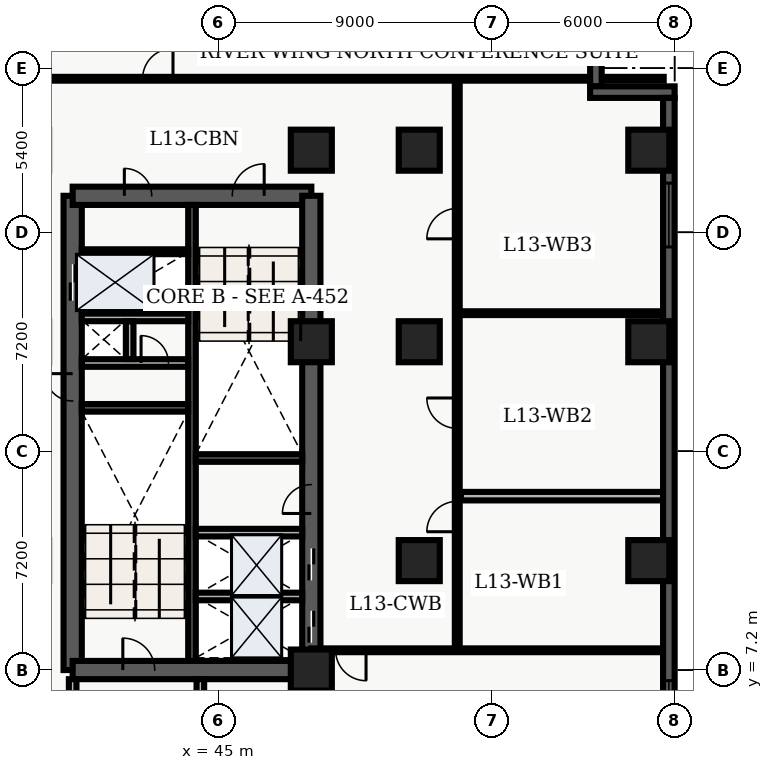
"""IFC4 building model, lengths in metres.
Left out: names, types, materials, properties, quantities, classifications, styles, units other than length and angle.
Written with IfcOpenShell. Run it as: python <this file> out.ifc"""

import sys

from ifc_helpers import new_model, entity, si_unit, converted_unit, direction, frame, origin_with_axes, origin_2d_with_axis, place, context, subcontext, project, spatial, polyline, rectangle, outline, extrude, element, fill, save


model = new_model("IFC4")
c1 = context("Model", 3, precision=1e-05, world=origin_with_axes(), true_north=direction((0.0, 1.0)))
c2 = subcontext(c1, "Body", "Model", "MODEL_VIEW")
j1 = project(units=[si_unit("LENGTHUNIT", "METRE"), converted_unit("PLANEANGLEUNIT", "DEGREE", entity("IfcPlaneAngleMeasure", 0.017), si_unit("PLANEANGLEUNIT", "RADIAN"), dimensions=[0, 0, 0, 0, 0, 0, 0])], contexts=[c1])
p1 = place(None, origin_with_axes())
s1 = spatial("IfcSite", under=j1, at=p1, CompositionType="ELEMENT")
p2 = place(p1, origin_with_axes())
s2 = spatial("IfcBuilding", under=s1, at=p2, CompositionType="ELEMENT")
p3 = place(p2, frame((0.0, 0.0, 56.1), z_axis=(0.0, 0.0, 1.0), x_axis=(1.0, 0.0, 0.0)))
s3 = spatial("IfcBuildingStorey", under=s2, at=p3, CompositionType="ELEMENT", Elevation=56.1)
p4 = place(p3, frame((40.2, 7.2, 0.0), z_axis=(0.0, 0.0, 1.0), x_axis=(0.0, 1.0, 0.0)))
e1 = element("IfcWall", 1, at=p4, inside=s3, PredefinedType="SHEAR", context=c2, shape_type="SweptSolid", body=[
    extrude(outline(polyline([(0.0, -0.3), (15.6, -0.3), (15.6, 0.3), (0.0, 0.3), (0.0, -0.3)])), origin_with_axes(), (0.0, 0.0, 1.0), 3.66),
])
p5 = place(p4, frame((12.75, 0.0, 0.0), z_axis=(0.0, 0.0, 1.0), x_axis=(1.0, 0.0, 0.0)))
e2 = element("IfcOpeningElement", 2, at=p5, cuts=e1, PredefinedType="OPENING", context=c2, shape_type="SweptSolid", body=[
    extrude(rectangle(XDim=1.2, YDim=0.62, at=origin_2d_with_axis()), origin_with_axes(), (0.0, 0.0, 1.0), 2.15),
])
p6 = place(p4, frame((9.3, 0.0, 0.0), z_axis=(0.0, 0.0, 1.0), x_axis=(1.0, 0.0, 0.0)))
e3 = element("IfcOpeningElement", 3, at=p6, cuts=e1, PredefinedType="OPENING", context=c2, shape_type="SweptSolid", body=[
    extrude(rectangle(XDim=0.9, YDim=0.62, at=origin_2d_with_axis()), origin_with_axes(), (0.0, 0.0, 1.0), 2.15),
])
p7 = place(p3, frame((40.2, 7.2, 0.0), z_axis=(0.0, 0.0, 1.0), x_axis=(1.0, 0.0, 0.0)))
e4 = element("IfcWall", 4, at=p7, inside=s3, PredefinedType="SHEAR", context=c2, shape_type="SweptSolid", body=[
    extrude(outline(polyline([(0.0, -0.3), (7.85, -0.3), (7.85, 0.3), (0.0, 0.3), (0.0, -0.3)])), origin_with_axes(), (0.0, 0.0, 1.0), 3.66),
])
p8 = place(p7, frame((2.175, 0.0, 0.0), z_axis=(0.0, 0.0, 1.0), x_axis=(1.0, 0.0, 0.0)))
e5 = element("IfcOpeningElement", 5, at=p8, cuts=e4, PredefinedType="OPENING", context=c2, shape_type="SweptSolid", body=[
    extrude(rectangle(XDim=1.05, YDim=0.62, at=origin_2d_with_axis()), origin_with_axes(), (0.0, 0.0, 1.0), 2.15),
])
p9 = place(p3, frame((40.2, 22.8, 0.0), z_axis=(0.0, 0.0, 1.0), x_axis=(1.0, 0.0, 0.0)))
e6 = element("IfcWall", 6, at=p9, inside=s3, PredefinedType="SHEAR", context=c2, shape_type="SweptSolid", body=[
    extrude(outline(polyline([(0.0, -0.3), (7.85, -0.3), (7.85, 0.3), (0.0, 0.3), (0.0, -0.3)])), origin_with_axes(), (0.0, 0.0, 1.0), 3.66),
])
p10 = place(p9, frame((5.775, 0.0, 0.0), z_axis=(0.0, 0.0, 1.0), x_axis=(1.0, 0.0, 0.0)))
e7 = element("IfcOpeningElement", 7, at=p10, cuts=e6, PredefinedType="OPENING", context=c2, shape_type="SweptSolid", body=[
    extrude(rectangle(XDim=1.05, YDim=0.62, at=origin_2d_with_axis()), origin_with_axes(), (0.0, 0.0, 1.0), 2.15),
])
p11 = place(p9, frame((2.15, 0.0, 0.0), z_axis=(0.0, 0.0, 1.0), x_axis=(1.0, 0.0, 0.0)))
e8 = element("IfcOpeningElement", 8, at=p11, cuts=e6, PredefinedType="OPENING", context=c2, shape_type="SweptSolid", body=[
    extrude(rectangle(XDim=0.9, YDim=0.62, at=origin_2d_with_axis()), origin_with_axes(), (0.0, 0.0, 1.0), 2.15),
])
p12 = place(p3, frame((48.05, 7.2, 0.0), z_axis=(0.0, 0.0, 1.0), x_axis=(0.0, 1.0, 0.0)))
e9 = element("IfcWall", 9, at=p12, inside=s3, PredefinedType="SHEAR", context=c2, shape_type="SweptSolid", body=[
    extrude(outline(polyline([(0.0, -0.3), (15.6, -0.3), (15.6, 0.3), (0.0, 0.3), (0.0, -0.3)])), origin_with_axes(), (0.0, 0.0, 1.0), 3.66),
])
p13 = place(p12, frame((1.425, 0.0, 0.0), z_axis=(0.0, 0.0, 1.0), x_axis=(1.0, 0.0, 0.0)))
e10 = element("IfcOpeningElement", 10, at=p13, cuts=e9, PredefinedType="OPENING", context=c2, shape_type="SweptSolid", body=[
    extrude(rectangle(XDim=1.05, YDim=0.62, at=origin_2d_with_axis()), origin_with_axes(), (0.0, 0.0, 1.0), 2.15),
])
p14 = place(p12, frame((3.475, 0.0, 0.0), z_axis=(0.0, 0.0, 1.0), x_axis=(1.0, 0.0, 0.0)))
e11 = element("IfcOpeningElement", 11, at=p14, cuts=e9, PredefinedType="OPENING", context=c2, shape_type="SweptSolid", body=[
    extrude(rectangle(XDim=1.05, YDim=0.62, at=origin_2d_with_axis()), origin_with_axes(), (0.0, 0.0, 1.0), 2.15),
])
p15 = place(p12, frame((5.625, 0.0, 0.0), z_axis=(0.0, 0.0, 1.0), x_axis=(1.0, 0.0, 0.0)))
e12 = element("IfcOpeningElement", 12, at=p15, cuts=e9, PredefinedType="OPENING", context=c2, shape_type="SweptSolid", body=[
    extrude(rectangle(XDim=0.95, YDim=0.62, at=origin_2d_with_axis()), origin_with_axes(), (0.0, 0.0, 1.0), 2.15),
])
p16 = place(p3, frame((44.125, 7.5, 0.0), z_axis=(0.0, 0.0, 1.0), x_axis=(0.0, 1.0, 0.0)))
e13 = element("IfcWall", 13, at=p16, inside=s3, PredefinedType="SHEAR", context=c2, shape_type="SweptSolid", body=[
    extrude(outline(polyline([(0.0, -0.125), (15.0, -0.125), (15.0, 0.125), (0.0, 0.125), (0.0, -0.125)])), origin_with_axes(), (0.0, 0.0, 1.0), 3.66),
])
for number, where, z_axis, x_axis in (
    (14, (40.5, 15.825, 0.0), (0.0, 0.0, 1.0), (1.0, 0.0, 0.0)),
    (15, (44.25, 14.175, 0.0), (0.0, 0.0, 1.0), (1.0, 0.0, 0.0)),
):
    element("IfcWall", number, at=place(p3, frame(where, z_axis=z_axis, x_axis=x_axis)), inside=s3, PredefinedType="SHEAR", context=c2, shape_type="SweptSolid", body=[
        extrude(outline(polyline([(0.0, -0.125), (3.5, -0.125), (3.5, 0.125), (0.0, 0.125), (0.0, -0.125)])), origin_with_axes(), (0.0, 0.0, 1.0), 3.66),
    ])
p17 = place(p3, frame((40.5, 17.3, 0.0), z_axis=(0.0, 0.0, 1.0), x_axis=(1.0, 0.0, 0.0)))
e16 = element("IfcWall", 16, at=p17, inside=s3, PredefinedType="SOLIDWALL", context=c2, shape_type="SweptSolid", body=[
    extrude(outline(polyline([(0.0, -0.125), (3.5, -0.125), (3.5, 0.125), (0.0, 0.125), (0.0, -0.125)])), origin_with_axes(), (0.0, 0.0, 1.0), 2.7),
])
p18 = place(p17, frame((2.4, 0.0, 0.0), z_axis=(0.0, 0.0, 1.0), x_axis=(1.0, 0.0, 0.0)))
e17 = element("IfcOpeningElement", 17, at=p18, cuts=e16, PredefinedType="OPENING", context=c2, shape_type="SweptSolid", body=[
    extrude(rectangle(XDim=0.9, YDim=0.27, at=origin_2d_with_axis()), origin_with_axes(), (0.0, 0.0, 1.0), 2.15),
])
p19 = place(p3, frame((40.5, 18.8, 0.0), z_axis=(0.0, 0.0, 1.0), x_axis=(1.0, 0.0, 0.0)))
e18 = element("IfcWall", 18, at=p19, inside=s3, PredefinedType="SOLIDWALL", context=c2, shape_type="SweptSolid", body=[
    extrude(outline(polyline([(0.0, -0.125), (3.5, -0.125), (3.5, 0.125), (0.0, 0.125), (0.0, -0.125)])), origin_with_axes(), (0.0, 0.0, 1.0), 2.7),
])
p20 = place(p3, frame((42.075, 17.43, 0.0), z_axis=(0.0, 0.0, 1.0), x_axis=(0.0, 1.0, 0.0)))
e19 = element("IfcWall", 19, at=p20, inside=s3, PredefinedType="SOLIDWALL", context=c2, shape_type="SweptSolid", body=[
    extrude(outline(polyline([(0.0, -0.125), (1.24, -0.125), (1.24, 0.125), (0.0, 0.125), (0.0, -0.125)])), origin_with_axes(), (0.0, 0.0, 1.0), 2.7),
])
p21 = place(p3, frame((40.2, 3.1, 0.0), z_axis=(0.0, 0.0, 1.0), x_axis=(0.0, 1.0, 0.0)))
e20 = element("IfcWall", 20, at=p21, inside=s3, PredefinedType="SOLIDWALL", context=c2, shape_type="SweptSolid", body=[
    extrude(outline(polyline([(0.0, -0.125), (3.8, -0.125), (3.8, 0.125), (0.0, 0.125), (0.0, -0.125)])), origin_with_axes(), (0.0, 0.0, 1.0), 2.7),
])
p22 = place(p21, frame((2.075, 0.0, 0.0), z_axis=(0.0, 0.0, 1.0), x_axis=(1.0, 0.0, 0.0)))
e21 = element("IfcOpeningElement", 21, at=p22, cuts=e20, PredefinedType="OPENING", context=c2, shape_type="SweptSolid", body=[
    extrude(rectangle(XDim=1.05, YDim=0.27, at=origin_2d_with_axis()), origin_with_axes(), (0.0, 0.0, 1.0), 2.15),
])
p23 = place(p3, frame((44.4, 3.1, 0.0), z_axis=(0.0, 0.0, 1.0), x_axis=(0.0, 1.0, 0.0)))
e22 = element("IfcWall", 22, at=p23, inside=s3, PredefinedType="SOLIDWALL", context=c2, shape_type="SweptSolid", body=[
    extrude(outline(polyline([(0.0, -0.125), (3.8, -0.125), (3.8, 0.125), (0.0, 0.125), (0.0, -0.125)])), origin_with_axes(), (0.0, 0.0, 1.0), 2.7),
])
for number, where, z_axis, x_axis in (
    (23, (48.05, 7.2, 0.0), (0.0, 0.0, 1.0), (1.0, 0.0, 0.0)),
    (24, (48.05, 18.0, 0.0), (0.0, 0.0, 1.0), (1.0, 0.0, 0.0)),
    (25, (48.05, 24.3, 0.0), (0.0, 0.0, 1.0), (1.0, 0.0, 0.0)),
    (26, (51.6, 10.8, 0.0), (0.0, 0.0, 1.0), (1.0, 0.0, 0.0)),
    (27, (51.6, 18.0, 0.0), (0.0, 0.0, 1.0), (1.0, 0.0, 0.0)),
    (28, (51.6, 24.3, 0.0), (0.0, 0.0, 1.0), (1.0, 0.0, 0.0)),
    (29, (59.15, 10.8, 0.0), (0.0, 0.0, 1.0), (1.0, 0.0, 0.0)),
    (30, (59.15, 18.0, 0.0), (0.0, 0.0, 1.0), (1.0, 0.0, 0.0)),
    (31, (59.15, 24.3, 0.0), (0.0, 0.0, 1.0), (1.0, 0.0, 0.0)),
):
    element("IfcColumn", number, at=place(p3, frame(where, z_axis=z_axis, x_axis=x_axis)), inside=s3, PredefinedType="COLUMN", context=c2, shape_type="SweptSolid", body=[
        extrude(rectangle(XDim=1.35, YDim=1.35, at=origin_2d_with_axis()), origin_with_axes(), (0.0, 0.0, 1.0), 3.9),
    ])
p24 = place(p3, frame((40.5, 20.96, 0.0), z_axis=(0.0, 0.0, 1.0), x_axis=(1.0, 0.0, 0.0)))
e32 = element("IfcWall", 32, at=p24, inside=s3, PredefinedType="PARTITIONING", context=c2, shape_type="SweptSolid", body=[
    extrude(outline(polyline([(0.0, -0.08), (3.5, -0.08), (3.5, 0.08), (0.0, 0.08), (0.0, -0.08)])), origin_with_axes(), (0.0, 0.0, 1.0), 2.7),
])
for number, where, z_axis, x_axis in (
    (33, (44.25, 9.62, 0.0), (0.0, 0.0, 1.0), (1.0, 0.0, 0.0)),
    (34, (44.25, 11.72, 0.0), (0.0, 0.0, 1.0), (1.0, 0.0, 0.0)),
):
    element("IfcWall", number, at=place(p3, frame(where, z_axis=z_axis, x_axis=x_axis)), inside=s3, PredefinedType="SOLIDWALL", context=c2, shape_type="SweptSolid", body=[
        extrude(outline(polyline([(0.0, -0.125), (3.5, -0.125), (3.5, 0.125), (0.0, 0.125), (0.0, -0.125)])), origin_with_axes(), (0.0, 0.0, 1.0), 2.7),
    ])
p25 = place(p3, frame((52.85, 7.85, 0.0), z_axis=(0.0, 0.0, 1.0), x_axis=(0.0, 1.0, 0.0)))
e35 = element("IfcWall", 35, at=p25, inside=s3, PredefinedType="PARTITIONING", context=c2, shape_type="SweptSolid", body=[
    extrude(outline(polyline([(0.0, -0.08), (18.8, -0.08), (18.8, 0.08), (0.0, 0.08), (0.0, -0.08)])), origin_with_axes(), (0.0, 0.0, 1.0), 2.7),
])
p26 = place(p25, frame((4.4, 0.0, 0.0), z_axis=(0.0, 0.0, 1.0), x_axis=(1.0, 0.0, 0.0)))
e36 = element("IfcOpeningElement", 36, at=p26, cuts=e35, PredefinedType="OPENING", context=c2, shape_type="SweptSolid", body=[
    extrude(rectangle(XDim=1.0, YDim=0.18, at=origin_2d_with_axis()), origin_with_axes(), (0.0, 0.0, 1.0), 2.15),
])
p27 = place(p25, frame((7.799, 0.0, 0.0), z_axis=(0.0, 0.0, 1.0), x_axis=(1.0, 0.0, 0.0)))
e37 = element("IfcOpeningElement", 37, at=p27, cuts=e35, PredefinedType="OPENING", context=c2, shape_type="SweptSolid", body=[
    extrude(rectangle(XDim=1.0, YDim=0.18, at=origin_2d_with_axis()), origin_with_axes(), (0.0, 0.0, 1.0), 2.15),
])
p28 = place(p25, frame((14.034, 0.0, 0.0), z_axis=(0.0, 0.0, 1.0), x_axis=(1.0, 0.0, 0.0)))
e38 = element("IfcOpeningElement", 38, at=p28, cuts=e35, PredefinedType="OPENING", context=c2, shape_type="SweptSolid", body=[
    extrude(rectangle(XDim=1.0, YDim=0.18, at=origin_2d_with_axis()), origin_with_axes(), (0.0, 0.0, 1.0), 2.15),
])
p29 = place(p3, frame((59.64, 7.85, 0.0), z_axis=(0.0, 0.0, 1.0), x_axis=(-1.0, 0.0, 0.0)))
e39 = element("IfcWall", 39, at=p29, inside=s3, PredefinedType="PARTITIONING", context=c2, shape_type="SweptSolid", body=[
    extrude(outline(polyline([(0.0, -0.062), (11.59, -0.062), (11.59, 0.062), (0.0, 0.062), (0.0, -0.062)])), origin_with_axes(), (0.0, 0.0, 1.0), 2.7),
])
p30 = place(p29, frame((10.29, 0.0, 0.0), z_axis=(0.0, 0.0, 1.0), x_axis=(1.0, 0.0, 0.0)))
e40 = element("IfcOpeningElement", 40, at=p30, cuts=e39, PredefinedType="OPENING", context=c2, shape_type="SweptSolid", body=[
    extrude(rectangle(XDim=1.0, YDim=0.145, at=origin_2d_with_axis()), origin_with_axes(), (0.0, 0.0, 1.0), 2.15),
])
p31 = place(p3, frame((38.76, 26.65, 0.0), z_axis=(0.0, 0.0, 1.0), x_axis=(1.0, 0.0, 0.0)))
e41 = element("IfcWall", 41, at=p31, inside=s3, PredefinedType="PARTITIONING", context=c2, shape_type="SweptSolid", body=[
    extrude(outline(polyline([(0.0, -0.062), (20.88, -0.062), (20.88, 0.062), (0.0, 0.062), (0.0, -0.062)])), origin_with_axes(), (0.0, 0.0, 1.0), 2.7),
])
p32 = place(p31, frame((4.24, 0.0, 0.0), z_axis=(0.0, 0.0, 1.0), x_axis=(1.0, 0.0, 0.0)))
e42 = element("IfcOpeningElement", 42, at=p32, cuts=e41, PredefinedType="OPENING", context=c2, shape_type="SweptSolid", body=[
    extrude(rectangle(XDim=1.0, YDim=0.145, at=origin_2d_with_axis()), origin_with_axes(), (0.0, 0.0, 1.0), 2.15),
])
p33 = place(p3, frame((52.97, 12.92, 0.0), z_axis=(0.0, 0.0, 1.0), x_axis=(1.0, 0.0, 0.0)))
e43 = element("IfcWall", 43, at=p33, inside=s3, PredefinedType="PARTITIONING", context=c2, shape_type="SweptSolid", body=[
    extrude(outline(polyline([(0.0, -0.14), (6.655, -0.14), (6.655, 0.14), (0.0, 0.14), (0.0, -0.14)])), origin_with_axes(), (0.0, 0.0, 1.0), 2.7),
])
p34 = place(p3, frame((52.97, 18.939, 0.0), z_axis=(0.0, 0.0, 1.0), x_axis=(1.0, 0.0, 0.0)))
e44 = element("IfcWall", 44, at=p34, inside=s3, PredefinedType="PARTITIONING", context=c2, shape_type="SweptSolid", body=[
    extrude(outline(polyline([(0.0, -0.062), (6.655, -0.062), (6.655, 0.062), (0.0, 0.062), (0.0, -0.062)])), origin_with_axes(), (0.0, 0.0, 1.0), 2.7),
])
p35 = place(p3, frame((57.41, 28.42, 0.0), z_axis=(0.0, 0.0, 1.0), x_axis=(0.0, -1.0, 0.0)))
e45 = element("IfcWall", 45, at=p35, inside=s3, PredefinedType="SOLIDWALL", context=c2, shape_type="SweptSolid", body=[
    extrude(outline(polyline([(0.0, -0.19), (2.02, -0.19), (2.02, 0.19), (0.0, 0.19), (0.0, -0.19)])), origin_with_axes(), (0.0, 0.0, 1.0), 3.66),
])
p36 = place(p3, frame((57.22, 26.21, 0.0), z_axis=(0.0, 0.0, 1.0), x_axis=(1.0, 0.0, 0.0)))
e46 = element("IfcWall", 46, at=p36, inside=s3, PredefinedType="SOLIDWALL", context=c2, shape_type="SweptSolid", body=[
    extrude(outline(polyline([(0.0, -0.19), (2.78, -0.19), (2.78, 0.19), (0.0, 0.19), (0.0, -0.19)])), origin_with_axes(), (0.0, 0.0, 1.0), 3.66),
])
p37 = place(p3, frame((59.81, 26.02, 0.0), z_axis=(0.0, 0.0, 1.0), x_axis=(0.0, -1.0, 0.0)))
e47 = element("IfcWall", 47, at=p37, inside=s3, PredefinedType="SOLIDWALL", context=c2, shape_type="SweptSolid", body=[
    extrude(outline(polyline([(0.0, -0.19), (23.62, -0.19), (23.62, 0.19), (0.0, 0.19), (0.0, -0.19)])), origin_with_axes(), (0.0, 0.0, 1.0), 3.66),
])
p38 = place(p37, frame((3.853, 0.0, 0.45), z_axis=(0.0, 0.0, 1.0), x_axis=(1.0, 0.0, 0.0)))
e48 = element("IfcOpeningElement", 48, at=p38, cuts=e47, PredefinedType="OPENING", context=c2, shape_type="SweptSolid", body=[
    extrude(rectangle(XDim=2.1, YDim=0.4, at=origin_2d_with_axis()), origin_with_axes(), (0.0, 0.0, 1.0), 2.2),
])
p39 = place(p37, frame((20.218, 0.0, 0.45), z_axis=(0.0, 0.0, 1.0), x_axis=(1.0, 0.0, 0.0)))
e49 = element("IfcOpeningElement", 49, at=p39, cuts=e47, PredefinedType="OPENING", context=c2, shape_type="SweptSolid", body=[
    extrude(rectangle(XDim=2.1, YDim=0.4, at=origin_2d_with_axis()), origin_with_axes(), (0.0, 0.0, 1.0), 2.2),
])
p40 = place(p12, frame((1.425, 0.0, 0.0), z_axis=(0.0, 0.0, 1.0), x_axis=(1.0, 0.0, 0.0)))
e50 = element("IfcDoor", 50, at=p40, inside=s3, OperationType="SLIDING_TO_LEFT", PredefinedType="DOOR", context=c2, shape_type="SweptSolid", body=[
    extrude(rectangle(XDim=1.05, YDim=0.09, at=origin_2d_with_axis()), origin_with_axes(), (0.0, 0.0, 1.0), 2.15),
])
fill(e10, e50)
p41 = place(p12, frame((3.475, 0.0, 0.0), z_axis=(0.0, 0.0, 1.0), x_axis=(1.0, 0.0, 0.0)))
e51 = element("IfcDoor", 51, at=p41, inside=s3, OperationType="SLIDING_TO_RIGHT", PredefinedType="DOOR", context=c2, shape_type="SweptSolid", body=[
    extrude(rectangle(XDim=1.05, YDim=0.09, at=origin_2d_with_axis()), origin_with_axes(), (0.0, 0.0, 1.0), 2.15),
])
fill(e11, e51)
p42 = place(p4, frame((12.75, 0.0, 0.0), z_axis=(0.0, 0.0, 1.0), x_axis=(1.0, 0.0, 0.0)))
e52 = element("IfcDoor", 52, at=p42, inside=s3, OperationType="DOUBLE_DOOR_SLIDING", PredefinedType="DOOR", context=c2, shape_type="SweptSolid", body=[
    extrude(rectangle(XDim=1.2, YDim=0.09, at=origin_2d_with_axis()), origin_with_axes(), (0.0, 0.0, 1.0), 2.15),
])
fill(e2, e52)
p43 = place(p4, frame((9.3, 0.0, 0.0), z_axis=(0.0, 0.0, 1.0), x_axis=(1.0, 0.0, 0.0)))
e53 = element("IfcDoor", 53, at=p43, inside=s3, OperationType="SINGLE_SWING_RIGHT", PredefinedType="DOOR", context=c2, shape_type="SweptSolid", body=[
    extrude(rectangle(XDim=0.9, YDim=0.09, at=origin_2d_with_axis()), origin_with_axes(), (0.0, 0.0, 1.0), 2.15),
])
fill(e3, e53)
p44 = place(p17, frame((2.4, 0.0, 0.0), z_axis=(0.0, 0.0, 1.0), x_axis=(1.0, 0.0, 0.0)))
e54 = element("IfcDoor", 54, at=p44, inside=s3, OperationType="SINGLE_SWING_LEFT", PredefinedType="DOOR", context=c2, shape_type="SweptSolid", body=[
    extrude(rectangle(XDim=0.9, YDim=0.09, at=origin_2d_with_axis()), origin_with_axes(), (0.0, 0.0, 1.0), 2.15),
])
fill(e17, e54)
p45 = place(p7, frame((2.175, 0.0, 0.0), z_axis=(0.0, 0.0, 1.0), x_axis=(1.0, 0.0, 0.0)))
e55 = element("IfcDoor", 55, at=p45, inside=s3, OperationType="SINGLE_SWING_LEFT", PredefinedType="DOOR", context=c2, shape_type="SweptSolid", body=[
    extrude(rectangle(XDim=1.05, YDim=0.09, at=origin_2d_with_axis()), origin_with_axes(), (0.0, 0.0, 1.0), 2.15),
])
fill(e5, e55)
p46 = place(p9, frame((5.775, 0.0, 0.0), z_axis=(0.0, 0.0, 1.0), x_axis=(1.0, 0.0, 0.0)))
e56 = element("IfcDoor", 56, at=p46, inside=s3, OperationType="SINGLE_SWING_RIGHT", PredefinedType="DOOR", context=c2, shape_type="SweptSolid", body=[
    extrude(rectangle(XDim=1.05, YDim=0.09, at=origin_2d_with_axis()), origin_with_axes(), (0.0, 0.0, 1.0), 2.15),
])
fill(e7, e56)
p47 = place(p9, frame((2.15, 0.0, 0.0), z_axis=(0.0, 0.0, 1.0), x_axis=(1.0, 0.0, 0.0)))
e57 = element("IfcDoor", 57, at=p47, inside=s3, OperationType="SINGLE_SWING_LEFT", PredefinedType="DOOR", context=c2, shape_type="SweptSolid", body=[
    extrude(rectangle(XDim=0.9, YDim=0.09, at=origin_2d_with_axis()), origin_with_axes(), (0.0, 0.0, 1.0), 2.15),
])
fill(e8, e57)
p48 = place(p12, frame((5.625, 0.0, 0.0), z_axis=(0.0, 0.0, 1.0), x_axis=(1.0, 0.0, 0.0)))
e58 = element("IfcDoor", 58, at=p48, inside=s3, OperationType="SINGLE_SWING_LEFT", PredefinedType="DOOR", context=c2, shape_type="SweptSolid", body=[
    extrude(rectangle(XDim=0.95, YDim=0.09, at=origin_2d_with_axis()), origin_with_axes(), (0.0, 0.0, 1.0), 2.15),
])
fill(e12, e58)
p49 = place(p29, frame((10.29, 0.0, 0.0), z_axis=(0.0, 0.0, 1.0), x_axis=(1.0, 0.0, 0.0)))
e59 = element("IfcDoor", 59, at=p49, inside=s3, OperationType="SINGLE_SWING_LEFT", PredefinedType="DOOR", context=c2, shape_type="SweptSolid", body=[
    extrude(rectangle(XDim=1.0, YDim=0.075, at=origin_2d_with_axis()), origin_with_axes(), (0.0, 0.0, 1.0), 2.15),
])
fill(e40, e59)
p50 = place(p31, frame((4.24, 0.0, 0.0), z_axis=(0.0, 0.0, 1.0), x_axis=(1.0, 0.0, 0.0)))
e60 = element("IfcDoor", 60, at=p50, inside=s3, OperationType="SINGLE_SWING_RIGHT", PredefinedType="DOOR", context=c2, shape_type="SweptSolid", body=[
    extrude(rectangle(XDim=1.0, YDim=0.075, at=origin_2d_with_axis()), origin_with_axes(), (0.0, 0.0, 1.0), 2.15),
])
fill(e42, e60)
p51 = place(p25, frame((4.4, 0.0, 0.0), z_axis=(0.0, 0.0, 1.0), x_axis=(1.0, 0.0, 0.0)))
e61 = element("IfcDoor", 61, at=p51, inside=s3, OperationType="SINGLE_SWING_LEFT", PredefinedType="DOOR", context=c2, shape_type="SweptSolid", body=[
    extrude(rectangle(XDim=1.0, YDim=0.09, at=origin_2d_with_axis()), origin_with_axes(), (0.0, 0.0, 1.0), 2.15),
])
fill(e36, e61)
p52 = place(p25, frame((7.799, 0.0, 0.0), z_axis=(0.0, 0.0, 1.0), x_axis=(1.0, 0.0, 0.0)))
e62 = element("IfcDoor", 62, at=p52, inside=s3, OperationType="SINGLE_SWING_RIGHT", PredefinedType="DOOR", context=c2, shape_type="SweptSolid", body=[
    extrude(rectangle(XDim=1.0, YDim=0.09, at=origin_2d_with_axis()), origin_with_axes(), (0.0, 0.0, 1.0), 2.15),
])
fill(e37, e62)
p53 = place(p25, frame((14.034, 0.0, 0.0), z_axis=(0.0, 0.0, 1.0), x_axis=(1.0, 0.0, 0.0)))
e63 = element("IfcDoor", 63, at=p53, inside=s3, OperationType="SINGLE_SWING_LEFT", PredefinedType="DOOR", context=c2, shape_type="SweptSolid", body=[
    extrude(rectangle(XDim=1.0, YDim=0.09, at=origin_2d_with_axis()), origin_with_axes(), (0.0, 0.0, 1.0), 2.15),
])
fill(e38, e63)
p54 = place(p37, frame((3.853, 0.0, 0.45), z_axis=(0.0, 0.0, 1.0), x_axis=(1.0, 0.0, 0.0)))
e64 = element("IfcWindow", 64, at=p54, inside=s3, PredefinedType="WINDOW", context=c2, shape_type="SweptSolid", body=[
    extrude(rectangle(XDim=2.1, YDim=0.09, at=origin_2d_with_axis()), origin_with_axes(), (0.0, 0.0, 1.0), 2.2),
])
fill(e48, e64)
p55 = place(p37, frame((20.218, 0.0, 0.45), z_axis=(0.0, 0.0, 1.0), x_axis=(1.0, 0.0, 0.0)))
e65 = element("IfcWindow", 65, at=p55, inside=s3, PredefinedType="WINDOW", context=c2, shape_type="SweptSolid", body=[
    extrude(rectangle(XDim=2.1, YDim=0.09, at=origin_2d_with_axis()), origin_with_axes(), (0.0, 0.0, 1.0), 2.2),
])
fill(e49, e65)
save(model, sys.argv[1])
